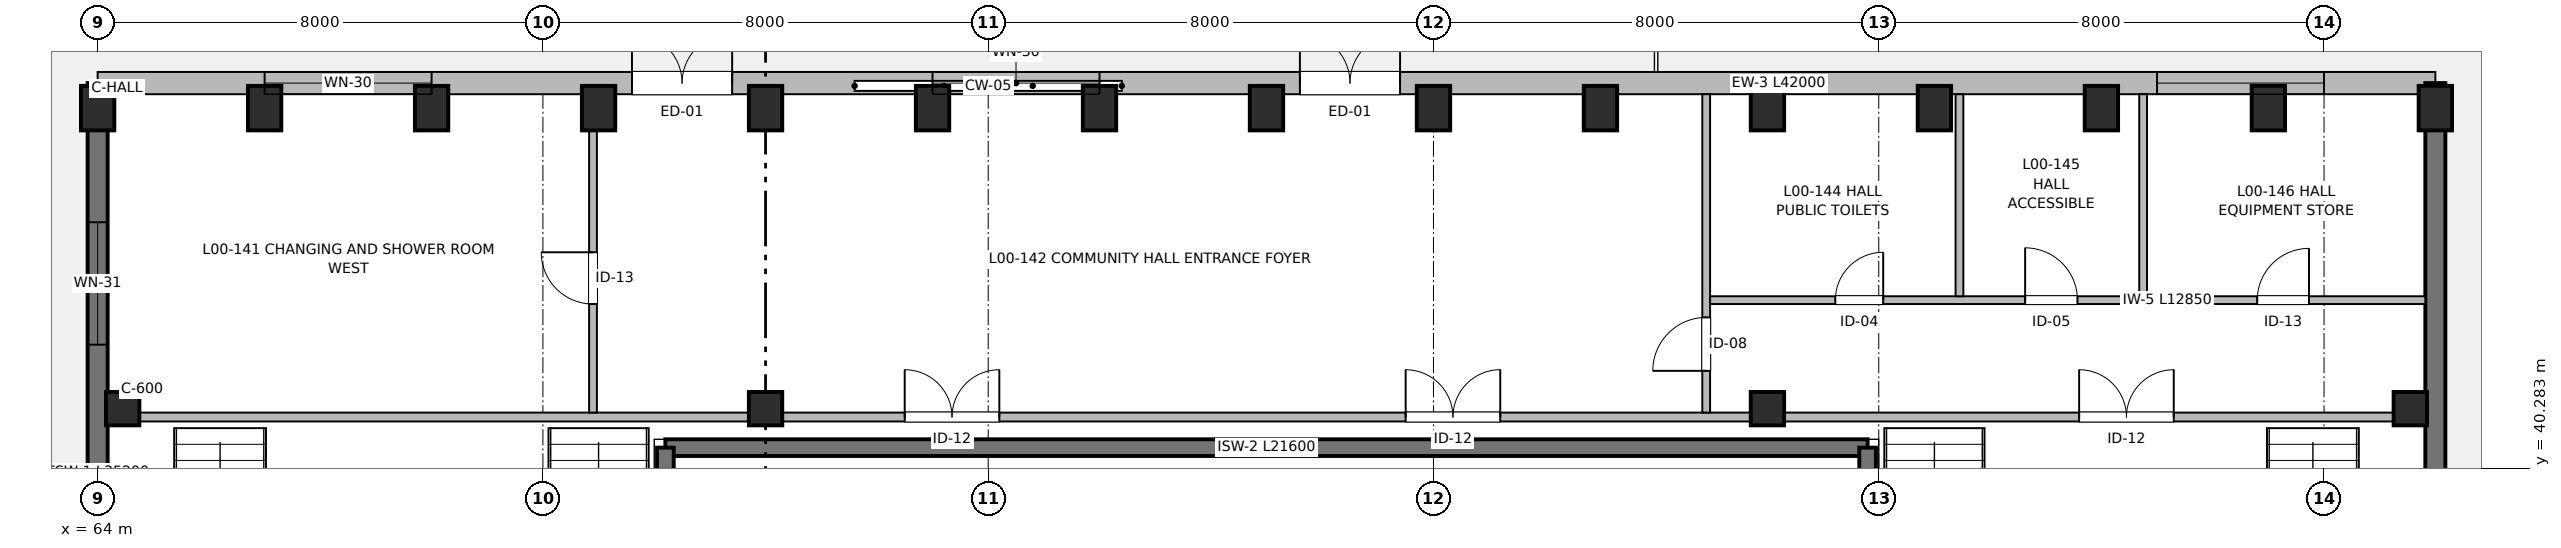
"""IFC4 building model, lengths in metres.
Left out: names, types, materials, properties, quantities, classifications, styles, units other than length and angle.
Written with IfcOpenShell. Run it as: python <this file> out.ifc"""

import sys

from ifc_helpers import new_model, si_unit, direction, frame, frame_2d, origin, origin_2d, place, context, subcontext, project, spatial, rectangle, extrude, element, fill, save


model = new_model("IFC4")
c1 = context("Model", 3, precision=1e-05, world=origin(), true_north=direction((0.0, 1.0)))
c2 = subcontext(c1, "Body", "Model", "MODEL_VIEW")
j1 = project(units=[si_unit("LENGTHUNIT", "METRE"), si_unit("PLANEANGLEUNIT", "RADIAN")], contexts=[c1])
p1 = place(None, origin())
s1 = spatial("IfcSite", under=j1, at=p1, CompositionType="ELEMENT")
p2 = place(p1, origin())
s2 = spatial("IfcBuilding", under=s1, at=p2, CompositionType="ELEMENT")
p3 = place(p2, origin())
s3 = spatial("IfcBuildingStorey", under=s2, at=p3, CompositionType="ELEMENT", Elevation=0.0)
p4 = place(p3, frame((64.0, 46.75, 0.0), z_axis=(0.0, 0.0, 1.0), x_axis=(1.0, 0.0, 0.0)))
e1 = element("IfcColumn", 1, at=p4, inside=s3, PredefinedType="COLUMN", context=c2, shape_type="SweptSolid", body=[
    extrude(rectangle(XDim=0.6, YDim=0.8, at=origin_2d()), origin(), (0.0, 0.0, 1.0), 4.16),
])
p5 = place(p3, frame((64.45, 41.35, 0.0), z_axis=(0.0, 0.0, 1.0), x_axis=(1.0, 0.0, 0.0)))
e2 = element("IfcColumn", 2, at=p5, inside=s3, PredefinedType="COLUMN", context=c2, shape_type="SweptSolid", body=[
    extrude(rectangle(XDim=0.6, YDim=0.6, at=origin_2d()), origin(), (0.0, 0.0, 1.0), 4.16),
])
for number, where, z_axis, x_axis in (
    (3, (67.0, 46.75, 0.0), (0.0, 0.0, 1.0), (1.0, 0.0, 0.0)),
    (4, (70.0, 46.75, 0.0), (0.0, 0.0, 1.0), (1.0, 0.0, 0.0)),
    (5, (73.0, 46.75, 0.0), (0.0, 0.0, 1.0), (1.0, 0.0, 0.0)),
):
    element("IfcColumn", number, at=place(p3, frame(where, z_axis=z_axis, x_axis=x_axis)), inside=s3, PredefinedType="COLUMN", context=c2, shape_type="SweptSolid", body=[
        extrude(rectangle(XDim=0.6, YDim=0.8, at=origin_2d()), origin(), (0.0, 0.0, 1.0), 4.16),
    ])
p6 = place(p3, frame((76.0, 41.35, 0.0), z_axis=(0.0, 0.0, 1.0), x_axis=(1.0, 0.0, 0.0)))
e6 = element("IfcColumn", 6, at=p6, inside=s3, PredefinedType="COLUMN", context=c2, shape_type="SweptSolid", body=[
    extrude(rectangle(XDim=0.6, YDim=0.6, at=origin_2d()), origin(), (0.0, 0.0, 1.0), 4.16),
])
for number, where, z_axis, x_axis in (
    (7, (76.0, 46.75, 0.0), (0.0, 0.0, 1.0), (1.0, 0.0, 0.0)),
    (8, (79.0, 46.75, 0.0), (0.0, 0.0, 1.0), (1.0, 0.0, 0.0)),
    (9, (82.0, 46.75, 0.0), (0.0, 0.0, 1.0), (1.0, 0.0, 0.0)),
    (10, (85.0, 46.75, 0.0), (0.0, 0.0, 1.0), (1.0, 0.0, 0.0)),
    (11, (88.0, 46.75, 0.0), (0.0, 0.0, 1.0), (1.0, 0.0, 0.0)),
    (12, (91.0, 46.75, 0.0), (0.0, 0.0, 1.0), (1.0, 0.0, 0.0)),
):
    element("IfcColumn", number, at=place(p3, frame(where, z_axis=z_axis, x_axis=x_axis)), inside=s3, PredefinedType="COLUMN", context=c2, shape_type="SweptSolid", body=[
        extrude(rectangle(XDim=0.6, YDim=0.8, at=origin_2d()), origin(), (0.0, 0.0, 1.0), 4.16),
    ])
p7 = place(p3, frame((94.0, 41.35, 0.0), z_axis=(0.0, 0.0, 1.0), x_axis=(1.0, 0.0, 0.0)))
e13 = element("IfcColumn", 13, at=p7, inside=s3, PredefinedType="COLUMN", context=c2, shape_type="SweptSolid", body=[
    extrude(rectangle(XDim=0.6, YDim=0.6, at=origin_2d()), origin(), (0.0, 0.0, 1.0), 4.16),
])
for number, where, z_axis, x_axis in (
    (14, (94.0, 46.75, 0.0), (0.0, 0.0, 1.0), (1.0, 0.0, 0.0)),
    (15, (97.0, 46.75, 0.0), (0.0, 0.0, 1.0), (1.0, 0.0, 0.0)),
    (16, (100.0, 46.75, 0.0), (0.0, 0.0, 1.0), (1.0, 0.0, 0.0)),
    (17, (103.0, 46.75, 0.0), (0.0, 0.0, 1.0), (1.0, 0.0, 0.0)),
):
    element("IfcColumn", number, at=place(p3, frame(where, z_axis=z_axis, x_axis=x_axis)), inside=s3, PredefinedType="COLUMN", context=c2, shape_type="SweptSolid", body=[
        extrude(rectangle(XDim=0.6, YDim=0.8, at=origin_2d()), origin(), (0.0, 0.0, 1.0), 4.16),
    ])
p8 = place(p3, frame((105.55, 41.35, 0.0), z_axis=(0.0, 0.0, 1.0), x_axis=(1.0, 0.0, 0.0)))
e18 = element("IfcColumn", 18, at=p8, inside=s3, PredefinedType="COLUMN", context=c2, shape_type="SweptSolid", body=[
    extrude(rectangle(XDim=0.6, YDim=0.6, at=origin_2d()), origin(), (0.0, 0.0, 1.0), 4.16),
])
p9 = place(p3, frame((106.0, 46.75, 0.0), z_axis=(0.0, 0.0, 1.0), x_axis=(1.0, 0.0, 0.0)))
e19 = element("IfcColumn", 19, at=p9, inside=s3, PredefinedType="COLUMN", context=c2, shape_type="SweptSolid", body=[
    extrude(rectangle(XDim=0.6, YDim=0.8, at=origin_2d()), origin(), (0.0, 0.0, 1.0), 4.16),
])
p10 = place(p3, frame((74.2, 40.65, 0.0), z_axis=(0.0, 0.0, 1.0), x_axis=(1.0, 0.0, 0.0)))
e20 = element("IfcWall", 20, at=p10, inside=s3, PredefinedType="SHEAR", context=c2, shape_type="SweptSolid", body=[
    extrude(rectangle(XDim=21.6, YDim=0.3, at=frame_2d((10.8, 0.0))), origin(), (0.0, 0.0, 1.0), 0.12),
])
for number, where, z_axis, x_axis in (
    (21, (74.2, 36.95, 0.0), (0.0, 0.0, 1.0), (0.0, 1.0, 0.0)),
    (22, (95.8, 36.95, 0.0), (0.0, 0.0, 1.0), (0.0, 1.0, 0.0)),
):
    element("IfcWall", number, at=place(p3, frame(where, z_axis=z_axis, x_axis=x_axis)), inside=s3, PredefinedType="SHEAR", context=c2, shape_type="SweptSolid", body=[
        extrude(rectangle(XDim=3.7, YDim=0.3, at=frame_2d((1.85, 0.0))), origin(), (0.0, 0.0, 1.0), 0.12),
    ])
p11 = place(p3, frame((64.0, 12.0, 0.0), z_axis=(0.0, 0.0, 1.0), x_axis=(0.0, 1.0, 0.0)))
e23 = element("IfcWall", 23, at=p11, inside=s3, PredefinedType="SHEAR", context=c2, shape_type="SweptSolid", body=[
    extrude(rectangle(XDim=35.2, YDim=0.36, at=frame_2d((17.6, 0.0))), origin(), (0.0, 0.0, 1.0), 6.84),
])
p12 = place(p11, frame((10.0, 0.0, 0.0)))
e24 = element("IfcOpeningElement", 24, at=p12, cuts=e23, PredefinedType="OPENING", context=c2, shape_type="SweptSolid", body=[
    extrude(rectangle(XDim=1.9, YDim=2.3, at=frame_2d((0.95, 1.15))), frame((0.0, 0.19, 0.0), z_axis=(0.0, -1.0, 0.0), x_axis=(1.0, 0.0, 0.0)), (0.0, 0.0, 1.0), 0.38),
])
p13 = place(p11, frame((24.0, 0.0, 0.0)))
e25 = element("IfcOpeningElement", 25, at=p13, cuts=e23, PredefinedType="OPENING", context=c2, shape_type="SweptSolid", body=[
    extrude(rectangle(XDim=1.9, YDim=2.3, at=frame_2d((0.95, 1.15))), frame((0.0, 0.19, 0.0), z_axis=(0.0, -1.0, 0.0), x_axis=(1.0, 0.0, 0.0)), (0.0, 0.0, 1.0), 0.38),
])
p14 = place(p11, frame((30.5, 0.0, 1.1)))
e26 = element("IfcOpeningElement", 26, at=p14, cuts=e23, PredefinedType="OPENING", context=c2, shape_type="SweptSolid", body=[
    extrude(rectangle(XDim=2.2, YDim=1.9, at=frame_2d((1.1, 0.95))), frame((0.0, 0.19, 0.0), z_axis=(0.0, -1.0, 0.0), x_axis=(1.0, 0.0, 0.0)), (0.0, 0.0, 1.0), 0.38),
])
p15 = place(p3, frame((64.0, 47.2, 0.0), z_axis=(0.0, 0.0, 1.0), x_axis=(1.0, 0.0, 0.0)))
e27 = element("IfcWall", 27, at=p15, inside=s3, PredefinedType="SOLIDWALL", context=c2, shape_type="SweptSolid", body=[
    extrude(rectangle(XDim=42.0, YDim=0.4, at=frame_2d((21.0, 0.0))), origin(), (0.0, 0.0, 1.0), 6.84),
])
p16 = place(p15, frame((9.6, 0.0, 0.0)))
e28 = element("IfcOpeningElement", 28, at=p16, cuts=e27, PredefinedType="OPENING", context=c2, shape_type="SweptSolid", body=[
    extrude(rectangle(XDim=1.8, YDim=2.4, at=frame_2d((0.9, 1.2))), frame((0.0, 0.21, 0.0), z_axis=(0.0, -1.0, 0.0), x_axis=(1.0, 0.0, 0.0)), (0.0, 0.0, 1.0), 0.42),
])
p17 = place(p15, frame((21.6, 0.0, 0.0)))
e29 = element("IfcOpeningElement", 29, at=p17, cuts=e27, PredefinedType="OPENING", context=c2, shape_type="SweptSolid", body=[
    extrude(rectangle(XDim=1.8, YDim=2.4, at=frame_2d((0.9, 1.2))), frame((0.0, 0.21, 0.0), z_axis=(0.0, -1.0, 0.0), x_axis=(1.0, 0.0, 0.0)), (0.0, 0.0, 1.0), 0.42),
])
p18 = place(p15, frame((3.0, 0.0, 5.1)))
e30 = element("IfcOpeningElement", 30, at=p18, cuts=e27, PredefinedType="OPENING", context=c2, shape_type="SweptSolid", body=[
    extrude(rectangle(XDim=3.0, YDim=1.1, at=frame_2d((1.5, 0.55))), frame((0.0, 0.21, 0.0), z_axis=(0.0, -1.0, 0.0), x_axis=(1.0, 0.0, 0.0)), (0.0, 0.0, 1.0), 0.42),
])
p19 = place(p15, frame((15.0, 0.0, 5.1)))
e31 = element("IfcOpeningElement", 31, at=p19, cuts=e27, PredefinedType="OPENING", context=c2, shape_type="SweptSolid", body=[
    extrude(rectangle(XDim=3.0, YDim=1.1, at=frame_2d((1.5, 0.55))), frame((0.0, 0.21, 0.0), z_axis=(0.0, -1.0, 0.0), x_axis=(1.0, 0.0, 0.0)), (0.0, 0.0, 1.0), 0.42),
])
p20 = place(p15, frame((37.0, 0.0, 5.1)))
e32 = element("IfcOpeningElement", 32, at=p20, cuts=e27, PredefinedType="OPENING", context=c2, shape_type="SweptSolid", body=[
    extrude(rectangle(XDim=3.0, YDim=1.1, at=frame_2d((1.5, 0.55))), frame((0.0, 0.21, 0.0), z_axis=(0.0, -1.0, 0.0), x_axis=(1.0, 0.0, 0.0)), (0.0, 0.0, 1.0), 0.42),
])
p21 = place(p3, frame((106.0, 47.2, 0.0), z_axis=(0.0, 0.0, 1.0), x_axis=(0.0, -1.0, 0.0)))
e33 = element("IfcWall", 33, at=p21, inside=s3, PredefinedType="SHEAR", context=c2, shape_type="SweptSolid", body=[
    extrude(rectangle(XDim=35.2, YDim=0.36, at=frame_2d((17.6, 0.0))), origin(), (0.0, 0.0, 1.0), 6.84),
])
p22 = place(p21, frame((10.0, 0.0, 0.0)))
e34 = element("IfcOpeningElement", 34, at=p22, cuts=e33, PredefinedType="OPENING", context=c2, shape_type="SweptSolid", body=[
    extrude(rectangle(XDim=1.9, YDim=2.3, at=frame_2d((0.95, 1.15))), frame((0.0, 0.19, 0.0), z_axis=(0.0, -1.0, 0.0), x_axis=(1.0, 0.0, 0.0)), (0.0, 0.0, 1.0), 0.38),
])
p23 = place(p21, frame((24.0, 0.0, 0.0)))
e35 = element("IfcOpeningElement", 35, at=p23, cuts=e33, PredefinedType="OPENING", context=c2, shape_type="SweptSolid", body=[
    extrude(rectangle(XDim=1.9, YDim=2.3, at=frame_2d((0.95, 1.15))), frame((0.0, 0.19, 0.0), z_axis=(0.0, -1.0, 0.0), x_axis=(1.0, 0.0, 0.0)), (0.0, 0.0, 1.0), 0.38),
])
p24 = place(p21, frame((31.0, 0.0, 2.2)))
e36 = element("IfcOpeningElement", 36, at=p24, cuts=e33, PredefinedType="OPENING", context=c2, shape_type="SweptSolid", body=[
    extrude(rectangle(XDim=1.5, YDim=0.75, at=frame_2d((0.75, 0.375))), frame((0.0, 0.19, 0.0), z_axis=(0.0, -1.0, 0.0), x_axis=(1.0, 0.0, 0.0)), (0.0, 0.0, 1.0), 0.38),
])
p25 = place(p3, frame((64.18, 41.2, 0.0), z_axis=(0.0, 0.0, 1.0), x_axis=(1.0, 0.0, 0.0)))
e37 = element("IfcWall", 37, at=p25, inside=s3, PredefinedType="PARTITIONING", context=c2, shape_type="SweptSolid", body=[
    extrude(rectangle(XDim=41.64, YDim=0.16, at=frame_2d((20.82, 0.0))), origin(), (0.0, 0.0, 1.0), 3.39),
])
p26 = place(p25, frame((14.32, 0.0, 0.0)))
e38 = element("IfcOpeningElement", 38, at=p26, cuts=e37, PredefinedType="OPENING", context=c2, shape_type="SweptSolid", body=[
    extrude(rectangle(XDim=1.7, YDim=2.3, at=frame_2d((0.85, 1.15))), frame((0.0, 0.09, 0.0), z_axis=(0.0, -1.0, 0.0), x_axis=(1.0, 0.0, 0.0)), (0.0, 0.0, 1.0), 0.18),
])
p27 = place(p25, frame((23.32, 0.0, 0.0)))
e39 = element("IfcOpeningElement", 39, at=p27, cuts=e37, PredefinedType="OPENING", context=c2, shape_type="SweptSolid", body=[
    extrude(rectangle(XDim=1.7, YDim=2.3, at=frame_2d((0.85, 1.15))), frame((0.0, 0.09, 0.0), z_axis=(0.0, -1.0, 0.0), x_axis=(1.0, 0.0, 0.0)), (0.0, 0.0, 1.0), 0.18),
])
p28 = place(p25, frame((35.42, 0.0, 0.0)))
e40 = element("IfcOpeningElement", 40, at=p28, cuts=e37, PredefinedType="OPENING", context=c2, shape_type="SweptSolid", body=[
    extrude(rectangle(XDim=1.7, YDim=2.3, at=frame_2d((0.85, 1.15))), frame((0.0, 0.09, 0.0), z_axis=(0.0, -1.0, 0.0), x_axis=(1.0, 0.0, 0.0)), (0.0, 0.0, 1.0), 0.18),
])
p29 = place(p3, frame((72.9, 41.28, 0.0), z_axis=(0.0, 0.0, 1.0), x_axis=(0.0, 1.0, 0.0)))
e41 = element("IfcWall", 41, at=p29, inside=s3, PredefinedType="PARTITIONING", context=c2, shape_type="SweptSolid", body=[
    extrude(rectangle(XDim=5.72, YDim=0.14, at=frame_2d((2.86, 0.0))), origin(), (0.0, 0.0, 1.0), 3.88),
])
p30 = place(p29, frame((1.95, 0.0, 0.0)))
e42 = element("IfcOpeningElement", 42, at=p30, cuts=e41, PredefinedType="OPENING", context=c2, shape_type="SweptSolid", body=[
    extrude(rectangle(XDim=0.93, YDim=2.15, at=frame_2d((0.465, 1.075))), frame((0.0, 0.08, 0.0), z_axis=(0.0, -1.0, 0.0), x_axis=(1.0, 0.0, 0.0)), (0.0, 0.0, 1.0), 0.16),
])
p31 = place(p3, frame((92.9, 41.28, 0.0), z_axis=(0.0, 0.0, 1.0), x_axis=(0.0, 1.0, 0.0)))
e43 = element("IfcWall", 43, at=p31, inside=s3, PredefinedType="PARTITIONING", context=c2, shape_type="SweptSolid", body=[
    extrude(rectangle(XDim=5.72, YDim=0.14, at=frame_2d((2.86, 0.0))), origin(), (0.0, 0.0, 1.0), 3.88),
])
p32 = place(p31, frame((0.75, 0.0, 0.0)))
e44 = element("IfcOpeningElement", 44, at=p32, cuts=e43, PredefinedType="OPENING", context=c2, shape_type="SweptSolid", body=[
    extrude(rectangle(XDim=0.96, YDim=2.15, at=frame_2d((0.48, 1.075))), frame((0.0, 0.08, 0.0), z_axis=(0.0, -1.0, 0.0), x_axis=(1.0, 0.0, 0.0)), (0.0, 0.0, 1.0), 0.16),
])
p33 = place(p3, frame((92.97, 43.3, 0.0), z_axis=(0.0, 0.0, 1.0), x_axis=(1.0, 0.0, 0.0)))
e45 = element("IfcWall", 45, at=p33, inside=s3, PredefinedType="PARTITIONING", context=c2, shape_type="SweptSolid", body=[
    extrude(rectangle(XDim=12.85, YDim=0.14, at=frame_2d((6.425, 0.0))), origin(), (0.0, 0.0, 1.0), 3.88),
])
p34 = place(p33, frame((2.25, 0.0, 0.0)))
e46 = element("IfcOpeningElement", 46, at=p34, cuts=e45, PredefinedType="OPENING", context=c2, shape_type="SweptSolid", body=[
    extrude(rectangle(XDim=0.86, YDim=2.1, at=frame_2d((0.43, 1.05))), frame((0.0, 0.08, 0.0), z_axis=(0.0, -1.0, 0.0), x_axis=(1.0, 0.0, 0.0)), (0.0, 0.0, 1.0), 0.16),
])
p35 = place(p33, frame((5.66, 0.0, 0.0)))
e47 = element("IfcOpeningElement", 47, at=p35, cuts=e45, PredefinedType="OPENING", context=c2, shape_type="SweptSolid", body=[
    extrude(rectangle(XDim=0.94, YDim=2.1, at=frame_2d((0.47, 1.05))), frame((0.0, 0.08, 0.0), z_axis=(0.0, -1.0, 0.0), x_axis=(1.0, 0.0, 0.0)), (0.0, 0.0, 1.0), 0.16),
])
p36 = place(p33, frame((9.83, 0.0, 0.0)))
e48 = element("IfcOpeningElement", 48, at=p36, cuts=e45, PredefinedType="OPENING", context=c2, shape_type="SweptSolid", body=[
    extrude(rectangle(XDim=0.93, YDim=2.15, at=frame_2d((0.465, 1.075))), frame((0.0, 0.08, 0.0), z_axis=(0.0, -1.0, 0.0), x_axis=(1.0, 0.0, 0.0)), (0.0, 0.0, 1.0), 0.16),
])
for number, where, z_axis, x_axis in (
    (49, (97.45, 43.37, 0.0), (0.0, 0.0, 1.0), (0.0, 1.0, 0.0)),
    (50, (100.75, 43.37, 0.0), (0.0, 0.0, 1.0), (0.0, 1.0, 0.0)),
):
    element("IfcWall", number, at=place(p3, frame(where, z_axis=z_axis, x_axis=x_axis)), inside=s3, PredefinedType="PARTITIONING", context=c2, shape_type="SweptSolid", body=[
        extrude(rectangle(XDim=3.63, YDim=0.14, at=frame_2d((1.815, 0.0))), origin(), (0.0, 0.0, 1.0), 3.88),
    ])
p37 = place(p16, origin())
e51 = element("IfcDoor", 51, at=p37, inside=s3, OperationType="DOUBLE_DOOR_SINGLE_SWING", PredefinedType="DOOR", context=c2, shape_type="SweptSolid", body=[
    extrude(rectangle(XDim=1.8, YDim=2.4, at=frame_2d((0.9, 1.2))), frame((0.0, 0.025, 0.0), z_axis=(0.0, -1.0, 0.0), x_axis=(1.0, 0.0, 0.0)), (0.0, 0.0, 1.0), 0.05),
])
fill(e28, e51)
p38 = place(p17, origin())
e52 = element("IfcDoor", 52, at=p38, inside=s3, OperationType="DOUBLE_DOOR_SINGLE_SWING", PredefinedType="DOOR", context=c2, shape_type="SweptSolid", body=[
    extrude(rectangle(XDim=1.8, YDim=2.4, at=frame_2d((0.9, 1.2))), frame((0.0, 0.025, 0.0), z_axis=(0.0, -1.0, 0.0), x_axis=(1.0, 0.0, 0.0)), (0.0, 0.0, 1.0), 0.05),
])
fill(e29, e52)
p39 = place(p18, origin())
e53 = element("IfcWindow", 53, at=p39, inside=s3, PartitioningType="SINGLE_PANEL", PredefinedType="WINDOW", context=c2, shape_type="SweptSolid", body=[
    extrude(rectangle(XDim=3.0, YDim=1.1, at=frame_2d((1.5, 0.55))), frame((0.0, 0.03, 0.0), z_axis=(0.0, -1.0, 0.0), x_axis=(1.0, 0.0, 0.0)), (0.0, 0.0, 1.0), 0.06),
])
fill(e30, e53)
p40 = place(p19, origin())
e54 = element("IfcWindow", 54, at=p40, inside=s3, PartitioningType="SINGLE_PANEL", PredefinedType="WINDOW", context=c2, shape_type="SweptSolid", body=[
    extrude(rectangle(XDim=3.0, YDim=1.1, at=frame_2d((1.5, 0.55))), frame((0.0, 0.03, 0.0), z_axis=(0.0, -1.0, 0.0), x_axis=(1.0, 0.0, 0.0)), (0.0, 0.0, 1.0), 0.06),
])
fill(e31, e54)
p41 = place(p20, origin())
e55 = element("IfcWindow", 55, at=p41, inside=s3, PartitioningType="SINGLE_PANEL", PredefinedType="WINDOW", context=c2, shape_type="SweptSolid", body=[
    extrude(rectangle(XDim=3.0, YDim=1.1, at=frame_2d((1.5, 0.55))), frame((0.0, 0.03, 0.0), z_axis=(0.0, -1.0, 0.0), x_axis=(1.0, 0.0, 0.0)), (0.0, 0.0, 1.0), 0.06),
])
fill(e32, e55)
p42 = place(p14, origin())
e56 = element("IfcWindow", 56, at=p42, inside=s3, PartitioningType="SINGLE_PANEL", PredefinedType="WINDOW", context=c2, shape_type="SweptSolid", body=[
    extrude(rectangle(XDim=2.2, YDim=1.9, at=frame_2d((1.1, 0.95))), frame((0.0, 0.03, 0.0), z_axis=(0.0, -1.0, 0.0), x_axis=(1.0, 0.0, 0.0)), (0.0, 0.0, 1.0), 0.06),
])
fill(e26, e56)
p43 = place(p26, origin())
e57 = element("IfcDoor", 57, at=p43, inside=s3, OperationType="DOUBLE_DOOR_SINGLE_SWING", PredefinedType="DOOR", context=c2, shape_type="SweptSolid", body=[
    extrude(rectangle(XDim=1.7, YDim=2.3, at=frame_2d((0.85, 1.15))), frame((0.0, 0.025, 0.0), z_axis=(0.0, -1.0, 0.0), x_axis=(1.0, 0.0, 0.0)), (0.0, 0.0, 1.0), 0.05),
])
fill(e38, e57)
p44 = place(p27, origin())
e58 = element("IfcDoor", 58, at=p44, inside=s3, OperationType="DOUBLE_DOOR_SINGLE_SWING", PredefinedType="DOOR", context=c2, shape_type="SweptSolid", body=[
    extrude(rectangle(XDim=1.7, YDim=2.3, at=frame_2d((0.85, 1.15))), frame((0.0, 0.025, 0.0), z_axis=(0.0, -1.0, 0.0), x_axis=(1.0, 0.0, 0.0)), (0.0, 0.0, 1.0), 0.05),
])
fill(e39, e58)
p45 = place(p28, origin())
e59 = element("IfcDoor", 59, at=p45, inside=s3, OperationType="DOUBLE_DOOR_SINGLE_SWING", PredefinedType="DOOR", context=c2, shape_type="SweptSolid", body=[
    extrude(rectangle(XDim=1.7, YDim=2.3, at=frame_2d((0.85, 1.15))), frame((0.0, 0.025, 0.0), z_axis=(0.0, -1.0, 0.0), x_axis=(1.0, 0.0, 0.0)), (0.0, 0.0, 1.0), 0.05),
])
fill(e40, e59)
p46 = place(p30, origin())
e60 = element("IfcDoor", 60, at=p46, inside=s3, OperationType="SINGLE_SWING_RIGHT", PredefinedType="DOOR", context=c2, shape_type="SweptSolid", body=[
    extrude(rectangle(XDim=0.93, YDim=2.15, at=frame_2d((0.465, 1.075))), frame((0.0, 0.025, 0.0), z_axis=(0.0, -1.0, 0.0), x_axis=(1.0, 0.0, 0.0)), (0.0, 0.0, 1.0), 0.05),
])
fill(e42, e60)
p47 = place(p32, origin())
e61 = element("IfcDoor", 61, at=p47, inside=s3, OperationType="SINGLE_SWING_LEFT", PredefinedType="DOOR", context=c2, shape_type="SweptSolid", body=[
    extrude(rectangle(XDim=0.96, YDim=2.15, at=frame_2d((0.48, 1.075))), frame((0.0, 0.025, 0.0), z_axis=(0.0, -1.0, 0.0), x_axis=(1.0, 0.0, 0.0)), (0.0, 0.0, 1.0), 0.05),
])
fill(e44, e61)
p48 = place(p34, origin())
e62 = element("IfcDoor", 62, at=p48, inside=s3, OperationType="SINGLE_SWING_RIGHT", PredefinedType="DOOR", context=c2, shape_type="SweptSolid", body=[
    extrude(rectangle(XDim=0.86, YDim=2.1, at=frame_2d((0.43, 1.05))), frame((0.0, 0.025, 0.0), z_axis=(0.0, -1.0, 0.0), x_axis=(1.0, 0.0, 0.0)), (0.0, 0.0, 1.0), 0.05),
])
fill(e46, e62)
p49 = place(p35, origin())
e63 = element("IfcDoor", 63, at=p49, inside=s3, OperationType="SINGLE_SWING_LEFT", PredefinedType="DOOR", context=c2, shape_type="SweptSolid", body=[
    extrude(rectangle(XDim=0.94, YDim=2.1, at=frame_2d((0.47, 1.05))), frame((0.0, 0.025, 0.0), z_axis=(0.0, -1.0, 0.0), x_axis=(1.0, 0.0, 0.0)), (0.0, 0.0, 1.0), 0.05),
])
fill(e47, e63)
p50 = place(p36, origin())
e64 = element("IfcDoor", 64, at=p50, inside=s3, OperationType="SINGLE_SWING_RIGHT", PredefinedType="DOOR", context=c2, shape_type="SweptSolid", body=[
    extrude(rectangle(XDim=0.93, YDim=2.15, at=frame_2d((0.465, 1.075))), frame((0.0, 0.025, 0.0), z_axis=(0.0, -1.0, 0.0), x_axis=(1.0, 0.0, 0.0)), (0.0, 0.0, 1.0), 0.05),
])
fill(e48, e64)
save(model, sys.argv[1])
